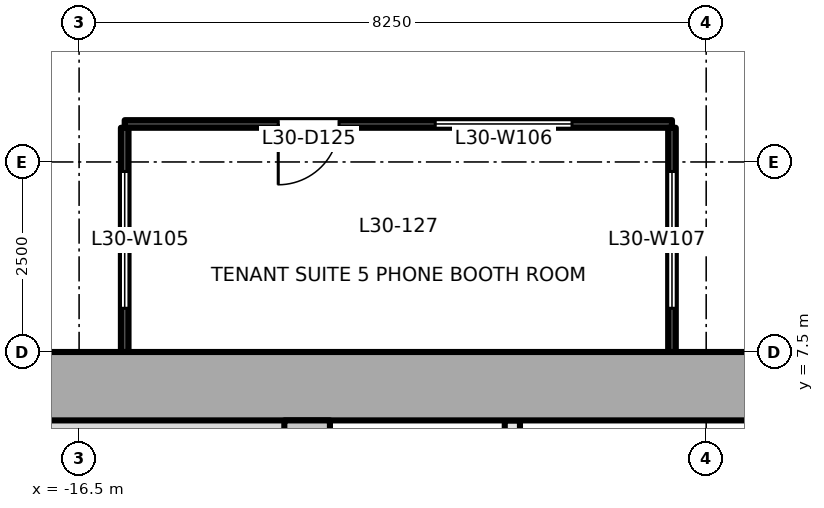
"""IFC4 building model, lengths in metres.
Left out: names, types, materials, properties, quantities, classifications, styles, units other than length and angle.
Written with IfcOpenShell. Run it as: python <this file> out.ifc"""

import sys

from ifc_helpers import new_model, si_unit, direction, frame, frame_2d, origin, place, context, subcontext, project, spatial, rectangle, extrude, element, fill, save


model = new_model("IFC4")
c1 = context("Model", 3, precision=1e-05, world=origin(), true_north=direction((0.0, 1.0)))
c2 = subcontext(c1, "Body", "Model", "MODEL_VIEW")
j1 = project(units=[si_unit("LENGTHUNIT", "METRE"), si_unit("PLANEANGLEUNIT", "RADIAN")], contexts=[c1])
p1 = place(None, origin())
s1 = spatial("IfcSite", under=j1, at=p1, CompositionType="ELEMENT")
p2 = place(p1, origin())
s2 = spatial("IfcBuilding", under=s1, at=p2, CompositionType="ELEMENT")
p3 = place(p2, frame((0.0, 0.0, 134.1)))
s3 = spatial("IfcBuildingStorey", under=s2, at=p3, CompositionType="ELEMENT", Elevation=134.1)
p4 = place(p3, frame((-18.0, 7.05, -0.2), z_axis=(0.0, 0.0, 1.0), x_axis=(1.0, 0.0, 0.0)))
e1 = element("IfcWall", 1, at=p4, inside=s3, PredefinedType="SHEAR", context=c2, shape_type="SweptSolid", body=[
    extrude(rectangle(XDim=36.0, YDim=0.9, at=frame_2d((18.0, 0.0))), origin(), (0.0, 0.0, 1.0), 4.0),
])
p5 = place(p3, frame((-13.5, -6.6, -0.2), z_axis=(0.0, 0.0, 1.0), x_axis=(0.0, 1.0, 0.0)))
e2 = element("IfcWall", 2, at=p5, inside=s3, PredefinedType="SHEAR", context=c2, shape_type="SweptSolid", body=[
    extrude(rectangle(XDim=13.2, YDim=0.6, at=frame_2d((6.6, 0.0))), origin(), (0.0, 0.0, 1.0), 4.0),
])
p6 = place(p3, frame((-10.8, -6.6, 0.0), z_axis=(0.0, 0.0, 1.0), x_axis=(0.0, 1.0, 0.0)))
e3 = element("IfcWall", 3, at=p6, inside=s3, PredefinedType="PARTITIONING", context=c2, shape_type="SweptSolid", body=[
    extrude(rectangle(XDim=13.2, YDim=0.2, at=frame_2d((6.6, 0.0))), origin(), (0.0, 0.0, 1.0), 3.8),
])
p7 = place(p6, frame((0.55, 0.0, 0.0)))
e4 = element("IfcOpeningElement", 4, at=p7, cuts=e3, PredefinedType="OPENING", context=c2, shape_type="SweptSolid", body=[
    extrude(rectangle(XDim=0.9, YDim=2.1, at=frame_2d((0.45, 1.05))), frame((0.0, 0.111, 0.0), z_axis=(0.0, -1.0, 0.0), x_axis=(1.0, 0.0, 0.0)), (0.0, 0.0, 1.0), 0.221),
])
p8 = place(p6, frame((2.9, 0.0, 0.0)))
e5 = element("IfcOpeningElement", 5, at=p8, cuts=e3, PredefinedType="OPENING", context=c2, shape_type="SweptSolid", body=[
    extrude(rectangle(XDim=1.2, YDim=2.1, at=frame_2d((0.6, 1.05))), frame((0.0, 0.111, 0.0), z_axis=(0.0, -1.0, 0.0), x_axis=(1.0, 0.0, 0.0)), (0.0, 0.0, 1.0), 0.221),
])
p9 = place(p6, frame((5.7, 0.0, 0.0)))
e6 = element("IfcOpeningElement", 6, at=p9, cuts=e3, PredefinedType="OPENING", context=c2, shape_type="SweptSolid", body=[
    extrude(rectangle(XDim=1.2, YDim=2.1, at=frame_2d((0.6, 1.05))), frame((0.0, 0.111, 0.0), z_axis=(0.0, -1.0, 0.0), x_axis=(1.0, 0.0, 0.0)), (0.0, 0.0, 1.0), 0.221),
])
p10 = place(p6, frame((8.5, 0.0, 0.0)))
e7 = element("IfcOpeningElement", 7, at=p10, cuts=e3, PredefinedType="OPENING", context=c2, shape_type="SweptSolid", body=[
    extrude(rectangle(XDim=1.2, YDim=2.1, at=frame_2d((0.6, 1.05))), frame((0.0, 0.111, 0.0), z_axis=(0.0, -1.0, 0.0), x_axis=(1.0, 0.0, 0.0)), (0.0, 0.0, 1.0), 0.221),
])
p11 = place(p6, frame((11.3, 0.0, 0.0)))
e8 = element("IfcOpeningElement", 8, at=p11, cuts=e3, PredefinedType="OPENING", context=c2, shape_type="SweptSolid", body=[
    extrude(rectangle(XDim=1.2, YDim=2.1, at=frame_2d((0.6, 1.05))), frame((0.0, 0.111, 0.0), z_axis=(0.0, -1.0, 0.0), x_axis=(1.0, 0.0, 0.0)), (0.0, 0.0, 1.0), 0.221),
])
p12 = place(p3, frame((-15.9, 10.45, 0.0), z_axis=(0.0, 0.0, 1.0), x_axis=(0.0, -1.0, 0.0)))
e9 = element("IfcWall", 9, at=p12, inside=s3, PredefinedType="PARTITIONING", context=c2, shape_type="SweptSolid", body=[
    extrude(rectangle(XDim=2.95, YDim=0.1, at=frame_2d((1.475, 0.0))), origin(), (0.0, 0.0, 1.0), 3.8),
])
p13 = place(p12, frame((0.575, 0.0, 0.9)))
e10 = element("IfcOpeningElement", 10, at=p13, cuts=e9, PredefinedType="OPENING", context=c2, shape_type="SweptSolid", body=[
    extrude(rectangle(XDim=1.8, YDim=1.2, at=frame_2d((0.9, 0.6))), frame((0.0, 0.061, 0.0), z_axis=(0.0, -1.0, 0.0), x_axis=(1.0, 0.0, 0.0)), (0.0, 0.0, 1.0), 0.121),
])
p14 = place(p3, frame((-8.7, 10.5, 0.0), z_axis=(0.0, 0.0, 1.0), x_axis=(-1.0, 0.0, 0.0)))
e11 = element("IfcWall", 11, at=p14, inside=s3, PredefinedType="PARTITIONING", context=c2, shape_type="SweptSolid", body=[
    extrude(rectangle(XDim=7.2, YDim=0.1, at=frame_2d((3.6, 0.0))), origin(), (0.0, 0.0, 1.0), 3.5),
])
p15 = place(p14, frame((4.38, 0.0, 0.0)))
e12 = element("IfcOpeningElement", 12, at=p15, cuts=e11, PredefinedType="OPENING", context=c2, shape_type="SweptSolid", body=[
    extrude(rectangle(XDim=0.8, YDim=2.1, at=frame_2d((0.4, 1.05))), frame((0.0, 0.061, 0.0), z_axis=(0.0, -1.0, 0.0), x_axis=(1.0, 0.0, 0.0)), (0.0, 0.0, 1.0), 0.121),
])
p16 = place(p14, frame((1.315, 0.0, 0.9)))
e13 = element("IfcOpeningElement", 13, at=p16, cuts=e11, PredefinedType="OPENING", context=c2, shape_type="SweptSolid", body=[
    extrude(rectangle(XDim=1.8, YDim=1.2, at=frame_2d((0.9, 0.6))), frame((0.0, 0.061, 0.0), z_axis=(0.0, -1.0, 0.0), x_axis=(1.0, 0.0, 0.0)), (0.0, 0.0, 1.0), 0.121),
])
p17 = place(p3, frame((-8.7, 7.5, 0.0), z_axis=(0.0, 0.0, 1.0), x_axis=(0.0, 1.0, 0.0)))
e14 = element("IfcWall", 14, at=p17, inside=s3, PredefinedType="PARTITIONING", context=c2, shape_type="SweptSolid", body=[
    extrude(rectangle(XDim=2.95, YDim=0.1, at=frame_2d((1.475, 0.0))), origin(), (0.0, 0.0, 1.0), 3.8),
])
p18 = place(p17, frame((0.575, 0.0, 0.9)))
e15 = element("IfcOpeningElement", 15, at=p18, cuts=e14, PredefinedType="OPENING", context=c2, shape_type="SweptSolid", body=[
    extrude(rectangle(XDim=1.8, YDim=1.2, at=frame_2d((0.9, 0.6))), frame((0.0, 0.061, 0.0), z_axis=(0.0, -1.0, 0.0), x_axis=(1.0, 0.0, 0.0)), (0.0, 0.0, 1.0), 0.121),
])
p19 = place(p15, origin())
e16 = element("IfcDoor", 16, at=p19, inside=s3, OperationType="SINGLE_SWING_RIGHT", PredefinedType="DOOR", context=c2, shape_type="SweptSolid", body=[
    extrude(rectangle(XDim=0.8, YDim=2.1, at=frame_2d((0.4, 1.05))), frame((0.0, 0.025, 0.0), z_axis=(0.0, -1.0, 0.0), x_axis=(1.0, 0.0, 0.0)), (0.0, 0.0, 1.0), 0.05),
])
fill(e12, e16)
p20 = place(p13, origin())
e17 = element("IfcWindow", 17, at=p20, inside=s3, PartitioningType="SINGLE_PANEL", PredefinedType="WINDOW", context=c2, shape_type="SweptSolid", body=[
    extrude(rectangle(XDim=1.8, YDim=1.2, at=frame_2d((0.9, 0.6))), frame((0.0, 0.03, 0.0), z_axis=(0.0, -1.0, 0.0), x_axis=(1.0, 0.0, 0.0)), (0.0, 0.0, 1.0), 0.06),
])
fill(e10, e17)
p21 = place(p16, origin())
e18 = element("IfcWindow", 18, at=p21, inside=s3, PartitioningType="SINGLE_PANEL", PredefinedType="WINDOW", context=c2, shape_type="SweptSolid", body=[
    extrude(rectangle(XDim=1.8, YDim=1.2, at=frame_2d((0.9, 0.6))), frame((0.0, 0.03, 0.0), z_axis=(0.0, -1.0, 0.0), x_axis=(1.0, 0.0, 0.0)), (0.0, 0.0, 1.0), 0.06),
])
fill(e13, e18)
p22 = place(p18, origin())
e19 = element("IfcWindow", 19, at=p22, inside=s3, PartitioningType="SINGLE_PANEL", PredefinedType="WINDOW", context=c2, shape_type="SweptSolid", body=[
    extrude(rectangle(XDim=1.8, YDim=1.2, at=frame_2d((0.9, 0.6))), frame((0.0, 0.03, 0.0), z_axis=(0.0, -1.0, 0.0), x_axis=(1.0, 0.0, 0.0)), (0.0, 0.0, 1.0), 0.06),
])
fill(e15, e19)
save(model, sys.argv[1])
